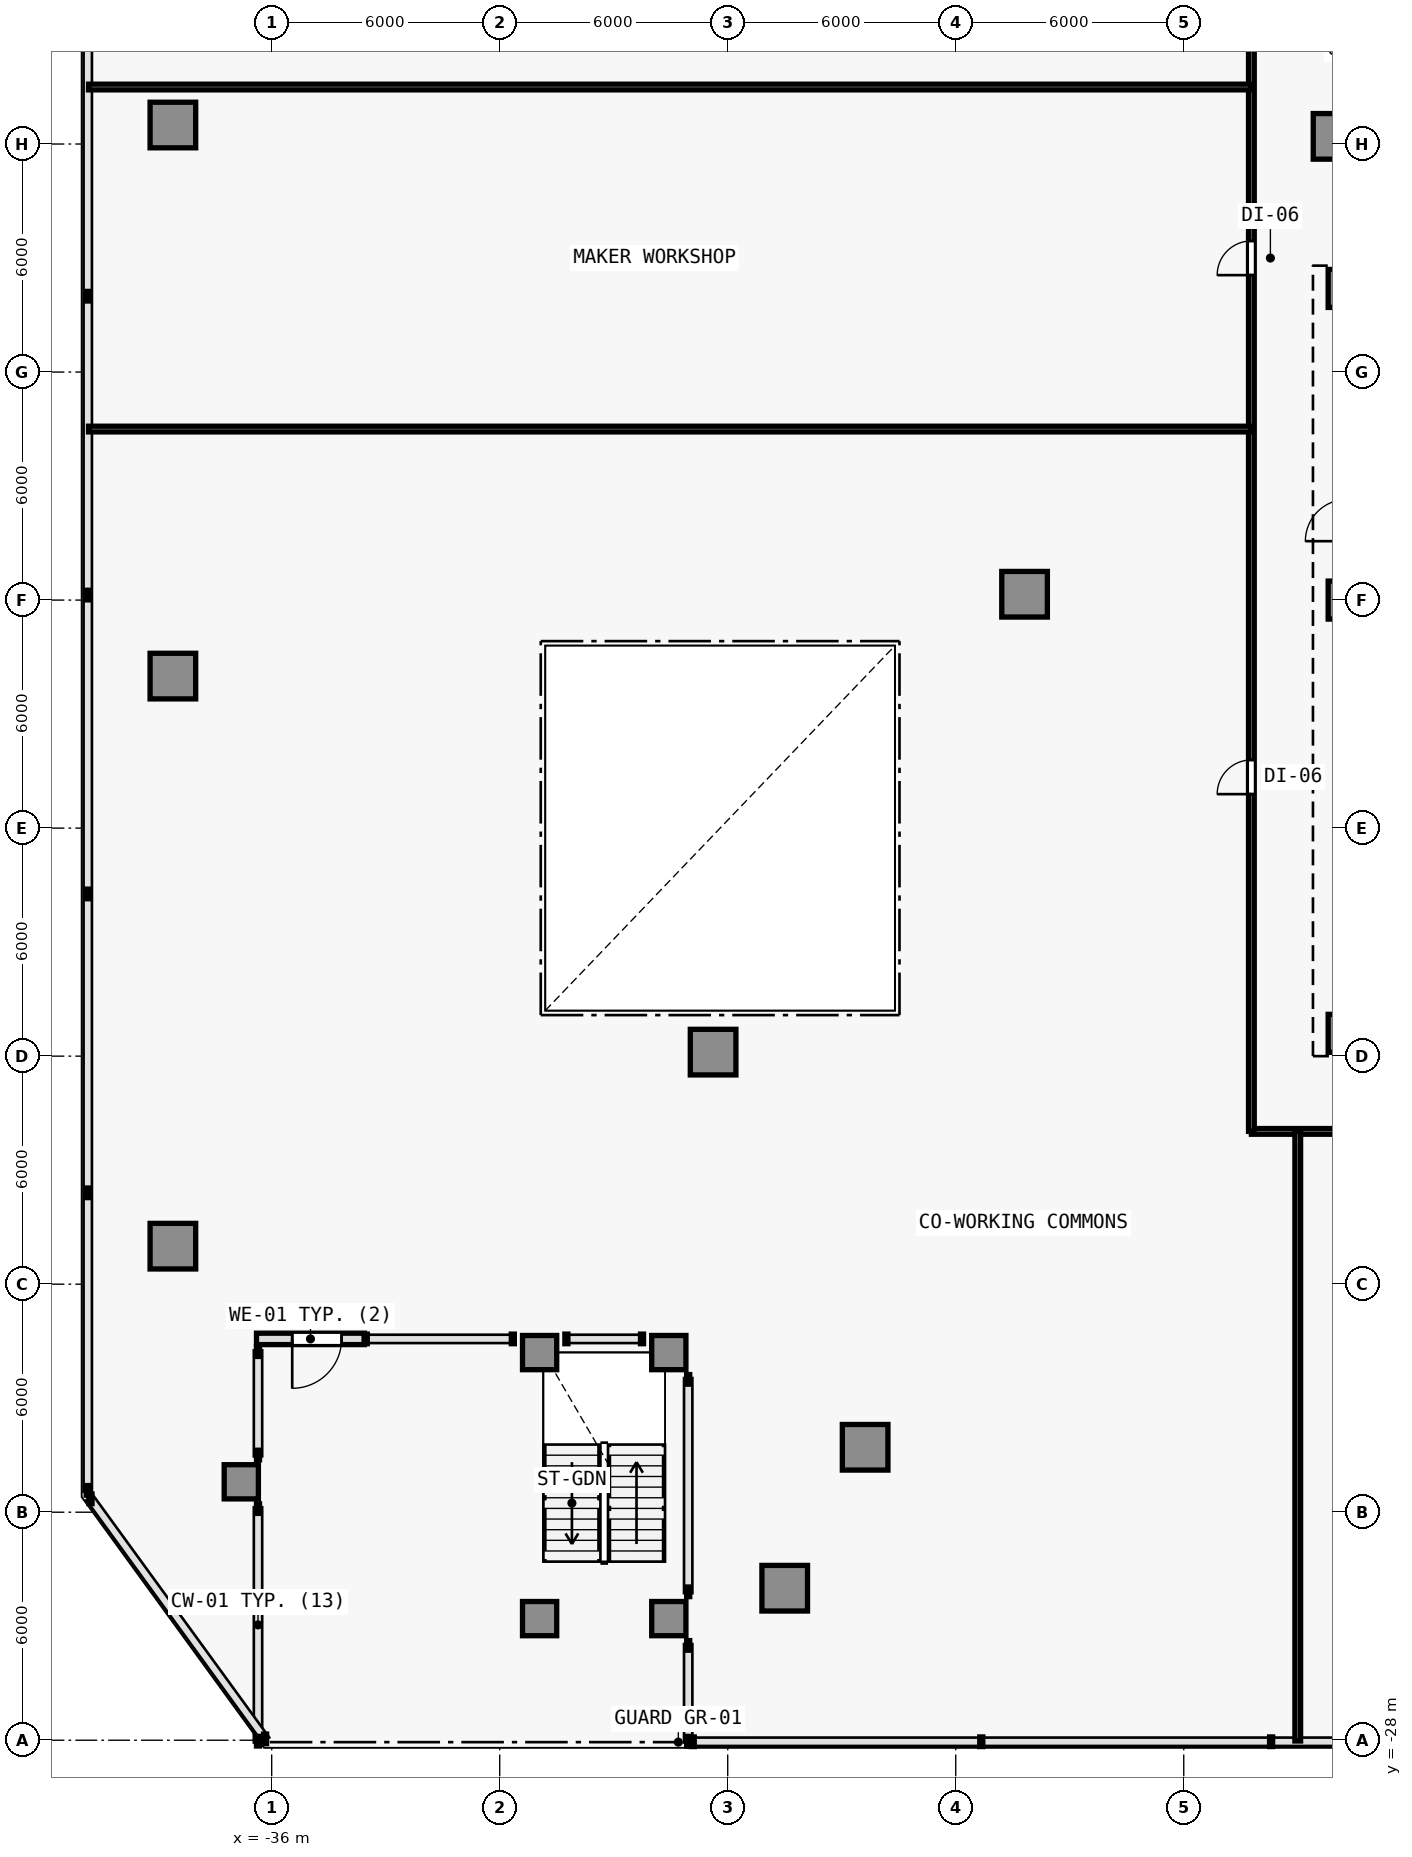
"""IFC4 building model, lengths in metres.
Left out: names, types, materials, properties, quantities, classifications, styles, units other than length and angle.
Written with IfcOpenShell. Run it as: python <this file> out.ifc"""

import sys

from ifc_helpers import new_model, si_unit, direction, frame, frame_2d, origin, origin_2d, place, context, subcontext, project, spatial, rectangle, extrude, element, fill, save


model = new_model("IFC4")
c1 = context("Model", 3, precision=1e-05, world=origin(), true_north=direction((0.0, 1.0)))
c2 = subcontext(c1, "Body", "Model", "MODEL_VIEW")
j1 = project(units=[si_unit("LENGTHUNIT", "METRE"), si_unit("PLANEANGLEUNIT", "RADIAN")], contexts=[c1])
p1 = place(None, origin())
s1 = spatial("IfcSite", under=j1, at=p1, CompositionType="ELEMENT")
p2 = place(p1, origin())
s2 = spatial("IfcBuilding", under=s1, at=p2, CompositionType="ELEMENT")
p3 = place(p2, frame((0.0, 0.0, 13.4)))
s3 = spatial("IfcBuildingStorey", under=s2, at=p3, CompositionType="ELEMENT", Elevation=13.4)
for number, where, z_axis, x_axis in (
    (1, (-7.7, -9.4, 0.0), (0.0, 0.0, 1.0), (1.0, 0.0, 0.0)),
    (2, (-7.7, 10.2, 0.0), (0.0, 0.0, 1.0), (1.0, 0.0, 0.0)),
    (3, (-7.7, 2.0, 0.0), (0.0, 0.0, 1.0), (1.0, 0.0, 0.0)),
):
    element("IfcColumn", number, at=place(p3, frame(where, z_axis=z_axis, x_axis=x_axis)), inside=s3, PredefinedType="COLUMN", context=c2, shape_type="SweptSolid", body=[
        extrude(rectangle(XDim=1.0, YDim=1.0, at=origin_2d()), origin(), (0.0, 0.0, 1.0), 4.2),
    ])
for number, where, z_axis, x_axis in (
    (4, (-38.6, 14.5, 0.0), (0.0, 0.0, 1.0), (1.0, 0.0, 0.0)),
    (5, (-38.6, 0.0, 0.0), (0.0, 0.0, 1.0), (1.0, 0.0, 0.0)),
    (6, (-38.6, -15.0, 0.0), (0.0, 0.0, 1.0), (1.0, 0.0, 0.0)),
    (7, (-22.5, -24.0, 0.0), (0.0, 0.0, 1.0), (1.0, 0.0, 0.0)),
    (8, (-20.384, -20.292, 0.0), (0.0, 0.0, 1.0), (1.0, 0.0, 0.0)),
    (9, (-7.992, 14.202, 0.0), (0.0, 0.0, 1.0), (1.0, 0.0, 0.0)),
    (10, (-16.188, 2.154, 0.0), (0.0, 0.0, 1.0), (1.0, 0.0, 0.0)),
    (11, (-24.385, -9.894, 0.0), (0.0, 0.0, 1.0), (1.0, 0.0, 0.0)),
):
    element("IfcColumn", number, at=place(p3, frame(where, z_axis=z_axis, x_axis=x_axis)), inside=s3, PredefinedType="COLUMN", context=c2, shape_type="SweptSolid", body=[
        extrude(rectangle(XDim=1.2, YDim=1.2, at=origin_2d()), origin(), (0.0, 0.0, 1.0), 4.2),
    ])
for number, where, z_axis, x_axis in (
    (12, (-36.8, -21.2, 0.0), (0.0, 0.0, 1.0), (1.0, 0.0, 0.0)),
    (13, (-28.95, -24.8, 0.0), (0.0, 0.0, 1.0), (1.0, 0.0, 0.0)),
    (14, (-25.55, -24.8, 0.0), (0.0, 0.0, 1.0), (1.0, 0.0, 0.0)),
    (15, (-28.95, -17.8, 0.0), (0.0, 0.0, 1.0), (1.0, 0.0, 0.0)),
    (16, (-25.55, -17.8, 0.0), (0.0, 0.0, 1.0), (1.0, 0.0, 0.0)),
):
    element("IfcColumn", number, at=place(p3, frame(where, z_axis=z_axis, x_axis=x_axis)), inside=s3, PredefinedType="COLUMN", context=c2, shape_type="SweptSolid", body=[
        extrude(rectangle(XDim=0.9, YDim=0.9, at=origin_2d()), origin(), (0.0, 0.0, 1.0), 4.2),
    ])
p4 = place(p3, frame((-33.56, -17.44, 0.0), z_axis=(0.0, 0.0, 1.0), x_axis=(-1.0, 0.0, 0.0)))
e17 = element("IfcWall", 17, at=p4, inside=s3, PredefinedType="SOLIDWALL", context=c2, shape_type="SweptSolid", body=[
    extrude(rectangle(XDim=2.84, YDim=0.3, at=frame_2d((1.42, 0.0))), origin(), (0.0, 0.0, 1.0), 3.92),
])
p5 = place(p4, frame((0.6, 0.0, 0.0)))
e18 = element("IfcOpeningElement", 18, at=p5, cuts=e17, PredefinedType="OPENING", context=c2, shape_type="SweptSolid", body=[
    extrude(rectangle(XDim=1.3, YDim=2.2, at=frame_2d((0.65, 1.1))), frame((0.0, 0.16, 0.0), z_axis=(0.0, -1.0, 0.0), x_axis=(1.0, 0.0, 0.0)), (0.0, 0.0, 1.0), 0.32),
])
p6 = place(p3, frame((-10.22, -11.98, 0.0), z_axis=(0.0, 0.0, 1.0), x_axis=(1.0, 0.0, 0.0)))
e19 = element("IfcWall", 19, at=p6, inside=s3, PredefinedType="PARTITIONING", context=c2, shape_type="SweptSolid", body=[
    extrude(rectangle(XDim=33.5, YDim=0.15, at=frame_2d((16.75, 0.0))), origin(), (0.0, 0.0, 1.0), 3.195),
])
p7 = place(p6, frame((8.52, 0.0, 0.0)))
e20 = element("IfcOpeningElement", 20, at=p7, cuts=e19, PredefinedType="OPENING", context=c2, shape_type="SweptSolid", body=[
    extrude(rectangle(XDim=0.9, YDim=2.1, at=frame_2d((0.45, 1.05))), frame((0.0, 0.085, 0.0), z_axis=(0.0, -1.0, 0.0), x_axis=(1.0, 0.0, 0.0)), (0.0, 0.0, 1.0), 0.17),
])
p8 = place(p6, frame((23.27, 0.0, 0.0)))
e21 = element("IfcOpeningElement", 21, at=p8, cuts=e19, PredefinedType="OPENING", context=c2, shape_type="SweptSolid", body=[
    extrude(rectangle(XDim=0.9, YDim=2.1, at=frame_2d((0.45, 1.05))), frame((0.0, 0.085, 0.0), z_axis=(0.0, -1.0, 0.0), x_axis=(1.0, 0.0, 0.0)), (0.0, 0.0, 1.0), 0.17),
])
p9 = place(p3, frame((-10.22, -11.98, 0.0), z_axis=(0.0, 0.0, 1.0), x_axis=(0.0, 1.0, 0.0)))
e22 = element("IfcWall", 22, at=p9, inside=s3, PredefinedType="PARTITIONING", context=c2, shape_type="SweptSolid", body=[
    extrude(rectangle(XDim=30.26, YDim=0.15, at=frame_2d((15.13, 0.0))), origin(), (0.0, 0.0, 1.0), 3.195),
])
p10 = place(p9, frame((8.874, 0.0, 0.0)))
e23 = element("IfcOpeningElement", 23, at=p10, cuts=e22, PredefinedType="OPENING", context=c2, shape_type="SweptSolid", body=[
    extrude(rectangle(XDim=0.9, YDim=2.1, at=frame_2d((0.45, 1.05))), frame((0.0, 0.085, 0.0), z_axis=(0.0, -1.0, 0.0), x_axis=(1.0, 0.0, 0.0)), (0.0, 0.0, 1.0), 0.17),
])
p11 = place(p9, frame((22.53, 0.0, 0.0)))
e24 = element("IfcOpeningElement", 24, at=p11, cuts=e22, PredefinedType="OPENING", context=c2, shape_type="SweptSolid", body=[
    extrude(rectangle(XDim=0.9, YDim=2.1, at=frame_2d((0.45, 1.05))), frame((0.0, 0.085, 0.0), z_axis=(0.0, -1.0, 0.0), x_axis=(1.0, 0.0, 0.0)), (0.0, 0.0, 1.0), 0.17),
])
p12 = place(p3, frame((-9.0, -28.02, 0.0), z_axis=(0.0, 0.0, 1.0), x_axis=(0.0, 1.0, 0.0)))
e25 = element("IfcWall", 25, at=p12, inside=s3, PredefinedType="PARTITIONING", context=c2, shape_type="SweptSolid", body=[
    extrude(rectangle(XDim=16.04, YDim=0.15, at=frame_2d((8.02, 0.0))), origin(), (0.0, 0.0, 1.0), 3.195),
])
p13 = place(p3, frame((-40.82, 6.5, 0.0), z_axis=(0.0, 0.0, 1.0), x_axis=(1.0, 0.0, 0.0)))
e26 = element("IfcWall", 26, at=p13, inside=s3, PredefinedType="PARTITIONING", context=c2, shape_type="SweptSolid", body=[
    extrude(rectangle(XDim=30.6, YDim=0.15, at=frame_2d((15.3, 0.0))), origin(), (0.0, 0.0, 1.0), 3.305),
])
p14 = place(p3, frame((-40.82, 15.5, 0.0), z_axis=(0.0, 0.0, 1.0), x_axis=(1.0, 0.0, 0.0)))
e27 = element("IfcWall", 27, at=p14, inside=s3, PredefinedType="PARTITIONING", context=c2, shape_type="SweptSolid", body=[
    extrude(rectangle(XDim=30.6, YDim=0.15, at=frame_2d((15.3, 0.0))), origin(), (0.0, 0.0, 1.0), 3.195),
])
p15 = place(p5, origin())
e28 = element("IfcDoor", 28, at=p15, inside=s3, OperationType="SINGLE_SWING_RIGHT", PredefinedType="DOOR", context=c2, shape_type="SweptSolid", body=[
    extrude(rectangle(XDim=1.3, YDim=2.2, at=frame_2d((0.65, 1.1))), frame((0.0, 0.025, 0.0), z_axis=(0.0, -1.0, 0.0), x_axis=(1.0, 0.0, 0.0)), (0.0, 0.0, 1.0), 0.05),
])
fill(e18, e28)
p16 = place(p10, origin())
e29 = element("IfcDoor", 29, at=p16, inside=s3, OperationType="SINGLE_SWING_LEFT", PredefinedType="DOOR", context=c2, shape_type="SweptSolid", body=[
    extrude(rectangle(XDim=0.9, YDim=2.1, at=frame_2d((0.45, 1.05))), frame((0.0, 0.025, 0.0), z_axis=(0.0, -1.0, 0.0), x_axis=(1.0, 0.0, 0.0)), (0.0, 0.0, 1.0), 0.05),
])
fill(e23, e29)
p17 = place(p11, origin())
e30 = element("IfcDoor", 30, at=p17, inside=s3, OperationType="SINGLE_SWING_LEFT", PredefinedType="DOOR", context=c2, shape_type="SweptSolid", body=[
    extrude(rectangle(XDim=0.9, YDim=2.1, at=frame_2d((0.45, 1.05))), frame((0.0, 0.025, 0.0), z_axis=(0.0, -1.0, 0.0), x_axis=(1.0, 0.0, 0.0)), (0.0, 0.0, 1.0), 0.05),
])
fill(e24, e30)
save(model, sys.argv[1])
